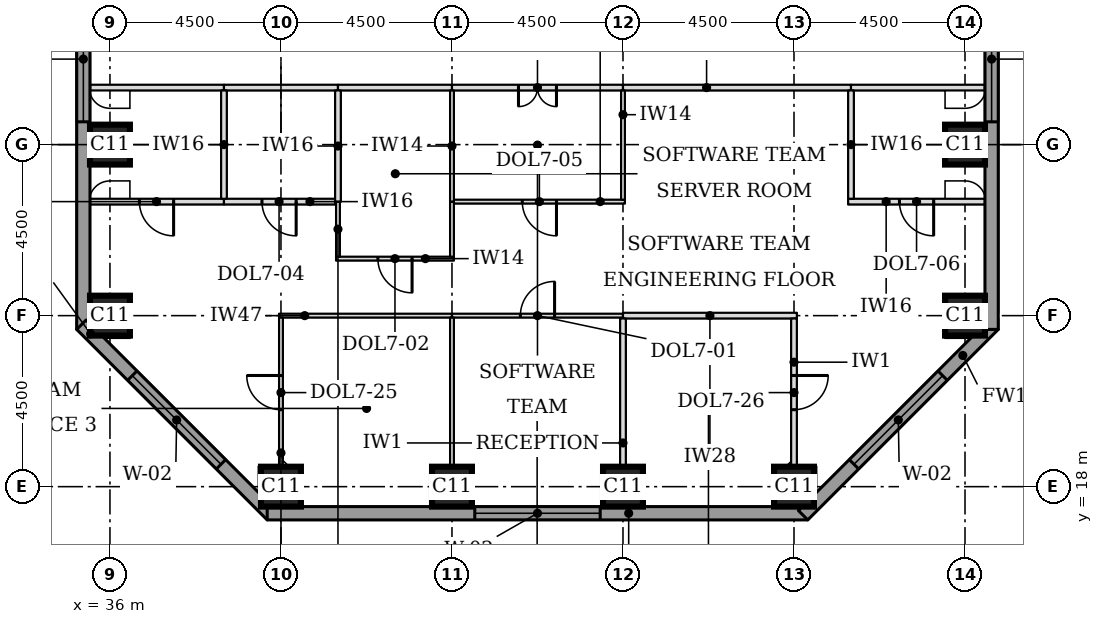
"""IFC4 building model, lengths in metres.
Left out: names, types, materials, properties, quantities, classifications, styles, units other than length and angle.
Written with IfcOpenShell. Run it as: python <this file> out.ifc"""

import sys

from ifc_helpers import new_model, si_unit, direction, frame, frame_2d, origin, origin_2d, place, context, subcontext, project, spatial, rectangle, extrude, element, fill, save


model = new_model("IFC4")
c1 = context("Model", 3, precision=1e-05, world=origin(), true_north=direction((0.0, 1.0)))
c2 = subcontext(c1, "Body", "Model", "MODEL_VIEW")
j1 = project(units=[si_unit("LENGTHUNIT", "METRE"), si_unit("PLANEANGLEUNIT", "RADIAN")], contexts=[c1])
p1 = place(None, origin())
s1 = spatial("IfcSite", under=j1, at=p1, CompositionType="ELEMENT")
p2 = place(p1, origin())
s2 = spatial("IfcBuilding", under=s1, at=p2, CompositionType="ELEMENT")
p3 = place(p2, frame((0.0, 0.0, 127.0)))
s3 = spatial("IfcBuildingStorey", under=s2, at=p3, CompositionType="ELEMENT", Elevation=127.0)
for number, where, z_axis, x_axis in (
    (1, (40.5, 18.0, 0.0), (0.0, 0.0, 1.0), (1.0, 0.0, 0.0)),
    (2, (45.0, 18.0, 0.0), (0.0, 0.0, 1.0), (1.0, 0.0, 0.0)),
    (3, (49.5, 18.0, 0.0), (0.0, 0.0, 1.0), (1.0, 0.0, 0.0)),
    (4, (54.0, 18.0, 0.0), (0.0, 0.0, 1.0), (1.0, 0.0, 0.0)),
    (5, (36.0, 22.5, 0.0), (0.0, 0.0, 1.0), (1.0, 0.0, 0.0)),
    (6, (58.5, 22.5, 0.0), (0.0, 0.0, 1.0), (1.0, 0.0, 0.0)),
    (7, (36.0, 27.0, 0.0), (0.0, 0.0, 1.0), (1.0, 0.0, 0.0)),
    (8, (58.5, 27.0, 0.0), (0.0, 0.0, 1.0), (1.0, 0.0, 0.0)),
):
    element("IfcColumn", number, at=place(p3, frame(where, z_axis=z_axis, x_axis=x_axis)), inside=s3, PredefinedType="COLUMN", context=c2, shape_type="SweptSolid", body=[
        extrude(rectangle(XDim=1.05, YDim=1.05, at=origin_2d()), origin(), (0.0, 0.0, 1.0), 3.7),
    ])
p4 = place(p3, frame((35.3, 39.975, 0.0), z_axis=(0.0, 0.0, 1.0), x_axis=(0.0, -1.0, 0.0)))
e9 = element("IfcWall", 9, at=p4, inside=s3, PredefinedType="STANDARD", context=c2, shape_type="SweptSolid", body=[
    extrude(rectangle(XDim=17.837, YDim=0.35, at=frame_2d((8.919, 0.0))), origin(), (0.0, 0.0, 1.0), 3.525),
])
p5 = place(p4, frame((0.5, 0.0, 0.9)))
e10 = element("IfcOpeningElement", 10, at=p5, cuts=e9, PredefinedType="OPENING", context=c2, shape_type="SweptSolid", body=[
    extrude(rectangle(XDim=3.3, YDim=1.9, at=frame_2d((1.65, 0.95))), frame((0.0, 0.185, 0.0), z_axis=(0.0, -1.0, 0.0), x_axis=(1.0, 0.0, 0.0)), (0.0, 0.0, 1.0), 0.37),
])
p6 = place(p4, frame((9.075, 0.0, 0.9)))
e11 = element("IfcOpeningElement", 11, at=p6, cuts=e9, PredefinedType="OPENING", context=c2, shape_type="SweptSolid", body=[
    extrude(rectangle(XDim=3.3, YDim=1.9, at=frame_2d((1.65, 0.95))), frame((0.0, 0.185, 0.0), z_axis=(0.0, -1.0, 0.0), x_axis=(1.0, 0.0, 0.0)), (0.0, 0.0, 1.0), 0.37),
])
p7 = place(p3, frame((35.249, 22.261, 0.0), z_axis=(0.0, 0.0, 1.0), x_axis=(0.707106781187, -0.707106781187, 0.0)))
e12 = element("IfcWall", 12, at=p7, inside=s3, PredefinedType="STANDARD", context=c2, shape_type="SweptSolid", body=[
    extrude(rectangle(XDim=7.089, YDim=0.35, at=frame_2d((3.544, 0.0))), origin(), (0.0, 0.0, 1.0), 3.525),
])
p8 = place(p7, frame((1.894, 0.0, 0.9)))
e13 = element("IfcOpeningElement", 13, at=p8, cuts=e12, PredefinedType="OPENING", context=c2, shape_type="SweptSolid", body=[
    extrude(rectangle(XDim=3.3, YDim=1.9, at=frame_2d((1.65, 0.95))), frame((0.0, 0.185, 0.0), z_axis=(0.0, -1.0, 0.0), x_axis=(1.0, 0.0, 0.0)), (0.0, 0.0, 1.0), 0.37),
])
p9 = place(p3, frame((40.138, 17.3, 0.0), z_axis=(0.0, 0.0, 1.0), x_axis=(1.0, 0.0, 0.0)))
e14 = element("IfcWall", 14, at=p9, inside=s3, PredefinedType="STANDARD", context=c2, shape_type="SweptSolid", body=[
    extrude(rectangle(XDim=14.225, YDim=0.35, at=frame_2d((7.112, 0.0))), origin(), (0.0, 0.0, 1.0), 3.525),
])
p10 = place(p9, frame((5.462, 0.0, 0.9)))
e15 = element("IfcOpeningElement", 15, at=p10, cuts=e14, PredefinedType="OPENING", context=c2, shape_type="SweptSolid", body=[
    extrude(rectangle(XDim=3.3, YDim=1.9, at=frame_2d((1.65, 0.95))), frame((0.0, 0.185, 0.0), z_axis=(0.0, -1.0, 0.0), x_axis=(1.0, 0.0, 0.0)), (0.0, 0.0, 1.0), 0.37),
])
p11 = place(p3, frame((54.239, 17.249, 0.0), z_axis=(0.0, 0.0, 1.0), x_axis=(0.707106781187, 0.707106781187, 0.0)))
e16 = element("IfcWall", 16, at=p11, inside=s3, PredefinedType="STANDARD", context=c2, shape_type="SweptSolid", body=[
    extrude(rectangle(XDim=7.089, YDim=0.35, at=frame_2d((3.544, 0.0))), origin(), (0.0, 0.0, 1.0), 3.525),
])
p12 = place(p11, frame((1.894, 0.0, 0.9)))
e17 = element("IfcOpeningElement", 17, at=p12, cuts=e16, PredefinedType="OPENING", context=c2, shape_type="SweptSolid", body=[
    extrude(rectangle(XDim=3.3, YDim=1.9, at=frame_2d((1.65, 0.95))), frame((0.0, 0.185, 0.0), z_axis=(0.0, -1.0, 0.0), x_axis=(1.0, 0.0, 0.0)), (0.0, 0.0, 1.0), 0.37),
])
p13 = place(p3, frame((59.2, 22.138, 0.0), z_axis=(0.0, 0.0, 1.0), x_axis=(0.0, 1.0, 0.0)))
e18 = element("IfcWall", 18, at=p13, inside=s3, PredefinedType="STANDARD", context=c2, shape_type="SweptSolid", body=[
    extrude(rectangle(XDim=17.837, YDim=0.35, at=frame_2d((8.919, 0.0))), origin(), (0.0, 0.0, 1.0), 3.525),
])
p14 = place(p13, frame((5.462, 0.0, 0.9)))
e19 = element("IfcOpeningElement", 19, at=p14, cuts=e18, PredefinedType="OPENING", context=c2, shape_type="SweptSolid", body=[
    extrude(rectangle(XDim=3.3, YDim=1.9, at=frame_2d((1.65, 0.95))), frame((0.0, 0.185, 0.0), z_axis=(0.0, -1.0, 0.0), x_axis=(1.0, 0.0, 0.0)), (0.0, 0.0, 1.0), 0.37),
])
p15 = place(p13, frame((14.037, 0.0, 0.9)))
e20 = element("IfcOpeningElement", 20, at=p15, cuts=e18, PredefinedType="OPENING", context=c2, shape_type="SweptSolid", body=[
    extrude(rectangle(XDim=3.3, YDim=1.9, at=frame_2d((1.65, 0.95))), frame((0.0, 0.185, 0.0), z_axis=(0.0, -1.0, 0.0), x_axis=(1.0, 0.0, 0.0)), (0.0, 0.0, 1.0), 0.37),
])
p16 = place(p3, frame((40.45, 22.5, 0.0), z_axis=(0.0, 0.0, 1.0), x_axis=(1.0, 0.0, 0.0)))
e21 = element("IfcWall", 21, at=p16, inside=s3, PredefinedType="PARTITIONING", context=c2, shape_type="SweptSolid", body=[
    extrude(rectangle(XDim=4.55, YDim=0.1, at=frame_2d((2.275, 0.0))), origin(), (0.0, 0.0, 1.0), 2.55),
])
p17 = place(p3, frame((45.0, 22.5, 0.0), z_axis=(0.0, 0.0, 1.0), x_axis=(1.0, 0.0, 0.0)))
e22 = element("IfcWall", 22, at=p17, inside=s3, PredefinedType="PARTITIONING", context=c2, shape_type="SweptSolid", body=[
    extrude(rectangle(XDim=4.5, YDim=0.1, at=frame_2d((2.25, 0.0))), origin(), (0.0, 0.0, 1.0), 2.55),
])
p18 = place(p17, frame((1.8, 0.0, 0.0)))
e23 = element("IfcOpeningElement", 23, at=p18, cuts=e22, PredefinedType="OPENING", context=c2, shape_type="SweptSolid", body=[
    extrude(rectangle(XDim=0.9, YDim=2.1, at=frame_2d((0.45, 1.05))), frame((0.0, 0.06, 0.0), z_axis=(0.0, -1.0, 0.0), x_axis=(1.0, 0.0, 0.0)), (0.0, 0.0, 1.0), 0.12),
])
p19 = place(p3, frame((49.5, 22.5, 0.0), z_axis=(0.0, 0.0, 1.0), x_axis=(1.0, 0.0, 0.0)))
e24 = element("IfcWall", 24, at=p19, inside=s3, PredefinedType="PARTITIONING", context=c2, shape_type="SweptSolid", body=[
    extrude(rectangle(XDim=4.575, YDim=0.15, at=frame_2d((2.288, 0.0))), origin(), (0.0, 0.0, 1.0), 2.55),
])
p20 = place(p3, frame((41.95, 24.0, 0.0), z_axis=(0.0, 0.0, 1.0), x_axis=(1.0, 0.0, 0.0)))
e25 = element("IfcWall", 25, at=p20, inside=s3, PredefinedType="PARTITIONING", context=c2, shape_type="SweptSolid", body=[
    extrude(rectangle(XDim=3.1, YDim=0.1, at=frame_2d((1.55, 0.0))), origin(), (0.0, 0.0, 1.0), 3.55),
])
p21 = place(p20, frame((1.1, 0.0, 0.0)))
e26 = element("IfcOpeningElement", 26, at=p21, cuts=e25, PredefinedType="OPENING", context=c2, shape_type="SweptSolid", body=[
    extrude(rectangle(XDim=0.9, YDim=2.1, at=frame_2d((0.45, 1.05))), frame((0.0, 0.06, 0.0), z_axis=(0.0, -1.0, 0.0), x_axis=(1.0, 0.0, 0.0)), (0.0, 0.0, 1.0), 0.12),
])
p22 = place(p3, frame((35.475, 25.5, 0.0), z_axis=(0.0, 0.0, 1.0), x_axis=(1.0, 0.0, 0.0)))
e27 = element("IfcWall", 27, at=p22, inside=s3, PredefinedType="PARTITIONING", context=c2, shape_type="SweptSolid", body=[
    extrude(rectangle(XDim=3.525, YDim=0.15, at=frame_2d((1.762, 0.0))), origin(), (0.0, 0.0, 1.0), 3.55),
])
p23 = place(p22, frame((1.3, 0.0, 0.0)))
e28 = element("IfcOpeningElement", 28, at=p23, cuts=e27, PredefinedType="OPENING", context=c2, shape_type="SweptSolid", body=[
    extrude(rectangle(XDim=0.9, YDim=2.1, at=frame_2d((0.45, 1.05))), frame((0.0, 0.085, 0.0), z_axis=(0.0, -1.0, 0.0), x_axis=(1.0, 0.0, 0.0)), (0.0, 0.0, 1.0), 0.17),
])
p24 = place(p3, frame((39.0, 25.5, 0.0), z_axis=(0.0, 0.0, 1.0), x_axis=(1.0, 0.0, 0.0)))
e29 = element("IfcWall", 29, at=p24, inside=s3, PredefinedType="PARTITIONING", context=c2, shape_type="SweptSolid", body=[
    extrude(rectangle(XDim=2.925, YDim=0.15, at=frame_2d((1.462, 0.0))), origin(), (0.0, 0.0, 1.0), 3.55),
])
p25 = place(p24, frame((1.0, 0.0, 0.0)))
e30 = element("IfcOpeningElement", 30, at=p25, cuts=e29, PredefinedType="OPENING", context=c2, shape_type="SweptSolid", body=[
    extrude(rectangle(XDim=0.9, YDim=2.1, at=frame_2d((0.45, 1.05))), frame((0.0, 0.085, 0.0), z_axis=(0.0, -1.0, 0.0), x_axis=(1.0, 0.0, 0.0)), (0.0, 0.0, 1.0), 0.17),
])
p26 = place(p3, frame((45.05, 25.5, 0.0), z_axis=(0.0, 0.0, 1.0), x_axis=(1.0, 0.0, 0.0)))
e31 = element("IfcWall", 31, at=p26, inside=s3, PredefinedType="PARTITIONING", context=c2, shape_type="SweptSolid", body=[
    extrude(rectangle(XDim=4.5, YDim=0.1, at=frame_2d((2.25, 0.0))), origin(), (0.0, 0.0, 1.0), 3.55),
])
p27 = place(p26, frame((1.8, 0.0, 0.0)))
e32 = element("IfcOpeningElement", 32, at=p27, cuts=e31, PredefinedType="OPENING", context=c2, shape_type="SweptSolid", body=[
    extrude(rectangle(XDim=0.9, YDim=2.1, at=frame_2d((0.45, 1.05))), frame((0.0, 0.06, 0.0), z_axis=(0.0, -1.0, 0.0), x_axis=(1.0, 0.0, 0.0)), (0.0, 0.0, 1.0), 0.12),
])
p28 = place(p3, frame((55.425, 25.5, 0.0), z_axis=(0.0, 0.0, 1.0), x_axis=(1.0, 0.0, 0.0)))
e33 = element("IfcWall", 33, at=p28, inside=s3, PredefinedType="PARTITIONING", context=c2, shape_type="SweptSolid", body=[
    extrude(rectangle(XDim=3.6, YDim=0.15, at=frame_2d((1.8, 0.0))), origin(), (0.0, 0.0, 1.0), 3.55),
])
p29 = place(p28, frame((1.35, 0.0, 0.0)))
e34 = element("IfcOpeningElement", 34, at=p29, cuts=e33, PredefinedType="OPENING", context=c2, shape_type="SweptSolid", body=[
    extrude(rectangle(XDim=0.9, YDim=2.1, at=frame_2d((0.45, 1.05))), frame((0.0, 0.085, 0.0), z_axis=(0.0, -1.0, 0.0), x_axis=(1.0, 0.0, 0.0)), (0.0, 0.0, 1.0), 0.17),
])
p30 = place(p3, frame((35.475, 28.5, 0.0), z_axis=(0.0, 0.0, 1.0), x_axis=(1.0, 0.0, 0.0)))
e35 = element("IfcWall", 35, at=p30, inside=s3, PredefinedType="PARTITIONING", context=c2, shape_type="SweptSolid", body=[
    extrude(rectangle(XDim=3.525, YDim=0.15, at=frame_2d((1.762, 0.0))), origin(), (0.0, 0.0, 1.0), 3.55),
])
for number, where, z_axis, x_axis in (
    (36, (39.0, 28.5, 0.0), (0.0, 0.0, 1.0), (1.0, 0.0, 0.0)),
    (37, (42.0, 28.5, 0.0), (0.0, 0.0, 1.0), (1.0, 0.0, 0.0)),
):
    element("IfcWall", number, at=place(p3, frame(where, z_axis=z_axis, x_axis=x_axis)), inside=s3, PredefinedType="PARTITIONING", context=c2, shape_type="SweptSolid", body=[
        extrude(rectangle(XDim=3.0, YDim=0.15, at=frame_2d((1.5, 0.0))), origin(), (0.0, 0.0, 1.0), 3.55),
    ])
p31 = place(p3, frame((45.0, 28.5, 0.0), z_axis=(0.0, 0.0, 1.0), x_axis=(1.0, 0.0, 0.0)))
e38 = element("IfcWall", 38, at=p31, inside=s3, PredefinedType="PARTITIONING", context=c2, shape_type="SweptSolid", body=[
    extrude(rectangle(XDim=4.5, YDim=0.15, at=frame_2d((2.25, 0.0))), origin(), (0.0, 0.0, 1.0), 3.55),
])
p32 = place(p31, frame((1.75, 0.0, 0.0)))
e39 = element("IfcOpeningElement", 39, at=p32, cuts=e38, PredefinedType="OPENING", context=c2, shape_type="SweptSolid", body=[
    extrude(rectangle(XDim=1.0, YDim=2.1, at=frame_2d((0.5, 1.05))), frame((0.0, 0.085, 0.0), z_axis=(0.0, -1.0, 0.0), x_axis=(1.0, 0.0, 0.0)), (0.0, 0.0, 1.0), 0.17),
])
p33 = place(p3, frame((49.5, 28.5, 0.0), z_axis=(0.0, 0.0, 1.0), x_axis=(1.0, 0.0, 0.0)))
e40 = element("IfcWall", 40, at=p33, inside=s3, PredefinedType="PARTITIONING", context=c2, shape_type="SweptSolid", body=[
    extrude(rectangle(XDim=6.0, YDim=0.15, at=frame_2d((3.0, 0.0))), origin(), (0.0, 0.0, 1.0), 3.55),
])
p34 = place(p3, frame((55.5, 28.5, 0.0), z_axis=(0.0, 0.0, 1.0), x_axis=(1.0, 0.0, 0.0)))
e41 = element("IfcWall", 41, at=p34, inside=s3, PredefinedType="PARTITIONING", context=c2, shape_type="SweptSolid", body=[
    extrude(rectangle(XDim=3.525, YDim=0.15, at=frame_2d((1.762, 0.0))), origin(), (0.0, 0.0, 1.0), 3.55),
])
p35 = place(p3, frame((45.0, 17.475, 0.0), z_axis=(0.0, 0.0, 1.0), x_axis=(0.0, 1.0, 0.0)))
e42 = element("IfcWall", 42, at=p35, inside=s3, PredefinedType="PARTITIONING", context=c2, shape_type="SweptSolid", body=[
    extrude(rectangle(XDim=4.975, YDim=0.1, at=frame_2d((2.487, 0.0))), origin(), (0.0, 0.0, 1.0), 3.55),
])
p36 = place(p3, frame((49.5, 17.475, 0.0), z_axis=(0.0, 0.0, 1.0), x_axis=(0.0, 1.0, 0.0)))
e43 = element("IfcWall", 43, at=p36, inside=s3, PredefinedType="PARTITIONING", context=c2, shape_type="SweptSolid", body=[
    extrude(rectangle(XDim=4.95, YDim=0.15, at=frame_2d((2.475, 0.0))), origin(), (0.0, 0.0, 1.0), 3.55),
])
p37 = place(p3, frame((40.5, 18.525, 0.0), z_axis=(0.0, 0.0, 1.0), x_axis=(0.0, 1.0, 0.0)))
e44 = element("IfcWall", 44, at=p37, inside=s3, PredefinedType="PARTITIONING", context=c2, shape_type="SweptSolid", body=[
    extrude(rectangle(XDim=3.925, YDim=0.1, at=frame_2d((1.962, 0.0))), origin(), (0.0, 0.0, 1.0), 3.55),
])
p38 = place(p37, frame((1.5, 0.0, 0.0)))
e45 = element("IfcOpeningElement", 45, at=p38, cuts=e44, PredefinedType="OPENING", context=c2, shape_type="SweptSolid", body=[
    extrude(rectangle(XDim=0.9, YDim=2.1, at=frame_2d((0.45, 1.05))), frame((0.0, 0.06, 0.0), z_axis=(0.0, -1.0, 0.0), x_axis=(1.0, 0.0, 0.0)), (0.0, 0.0, 1.0), 0.12),
])
p39 = place(p3, frame((54.0, 18.525, 0.0), z_axis=(0.0, 0.0, 1.0), x_axis=(0.0, 1.0, 0.0)))
e46 = element("IfcWall", 46, at=p39, inside=s3, PredefinedType="PARTITIONING", context=c2, shape_type="SweptSolid", body=[
    extrude(rectangle(XDim=3.9, YDim=0.15, at=frame_2d((1.95, 0.0))), origin(), (0.0, 0.0, 1.0), 3.55),
])
p40 = place(p39, frame((1.5, 0.0, 0.0)))
e47 = element("IfcOpeningElement", 47, at=p40, cuts=e46, PredefinedType="OPENING", context=c2, shape_type="SweptSolid", body=[
    extrude(rectangle(XDim=0.9, YDim=2.1, at=frame_2d((0.45, 1.05))), frame((0.0, 0.085, 0.0), z_axis=(0.0, -1.0, 0.0), x_axis=(1.0, 0.0, 0.0)), (0.0, 0.0, 1.0), 0.17),
])
for number, where, z_axis, x_axis in (
    (48, (42.0, 24.05, 0.0), (0.0, 0.0, 1.0), (0.0, 1.0, 0.0)),
    (49, (45.0, 24.05, 0.0), (0.0, 0.0, 1.0), (0.0, 1.0, 0.0)),
):
    element("IfcWall", number, at=place(p3, frame(where, z_axis=z_axis, x_axis=x_axis)), inside=s3, PredefinedType="PARTITIONING", context=c2, shape_type="SweptSolid", body=[
        extrude(rectangle(XDim=1.45, YDim=0.1, at=frame_2d((0.725, 0.0))), origin(), (0.0, 0.0, 1.0), 3.55),
    ])
p41 = place(p3, frame((42.0, 25.5, 0.0), z_axis=(0.0, 0.0, 1.0), x_axis=(0.0, 1.0, 0.0)))
e50 = element("IfcWall", 50, at=p41, inside=s3, PredefinedType="PARTITIONING", context=c2, shape_type="SweptSolid", body=[
    extrude(rectangle(XDim=2.925, YDim=0.15, at=frame_2d((1.462, 0.0))), origin(), (0.0, 0.0, 1.0), 3.55),
])
p42 = place(p3, frame((45.0, 25.5, 0.0), z_axis=(0.0, 0.0, 1.0), x_axis=(0.0, 1.0, 0.0)))
e51 = element("IfcWall", 51, at=p42, inside=s3, PredefinedType="PARTITIONING", context=c2, shape_type="SweptSolid", body=[
    extrude(rectangle(XDim=2.925, YDim=0.1, at=frame_2d((1.462, 0.0))), origin(), (0.0, 0.0, 1.0), 3.55),
])
p43 = place(p3, frame((49.5, 25.55, 0.0), z_axis=(0.0, 0.0, 1.0), x_axis=(0.0, 1.0, 0.0)))
e52 = element("IfcWall", 52, at=p43, inside=s3, PredefinedType="PARTITIONING", context=c2, shape_type="SweptSolid", body=[
    extrude(rectangle(XDim=2.875, YDim=0.1, at=frame_2d((1.438, 0.0))), origin(), (0.0, 0.0, 1.0), 3.55),
])
for number, where, z_axis, x_axis in (
    (53, (39.0, 25.575, 0.0), (0.0, 0.0, 1.0), (0.0, 1.0, 0.0)),
    (54, (55.5, 25.575, 0.0), (0.0, 0.0, 1.0), (0.0, 1.0, 0.0)),
):
    element("IfcWall", number, at=place(p3, frame(where, z_axis=z_axis, x_axis=x_axis)), inside=s3, PredefinedType="PARTITIONING", context=c2, shape_type="SweptSolid", body=[
        extrude(rectangle(XDim=2.85, YDim=0.15, at=frame_2d((1.425, 0.0))), origin(), (0.0, 0.0, 1.0), 3.55),
    ])
p44 = place(p6, origin())
e55 = element("IfcWindow", 55, at=p44, inside=s3, PartitioningType="SINGLE_PANEL", PredefinedType="WINDOW", context=c2, shape_type="SweptSolid", body=[
    extrude(rectangle(XDim=3.3, YDim=1.9, at=frame_2d((1.65, 0.95))), frame((0.0, 0.085, 0.0), z_axis=(0.0, -1.0, 0.0), x_axis=(1.0, 0.0, 0.0)), (0.0, 0.0, 1.0), 0.06),
])
fill(e11, e55)
p45 = place(p8, origin())
e56 = element("IfcWindow", 56, at=p45, inside=s3, PartitioningType="SINGLE_PANEL", PredefinedType="WINDOW", context=c2, shape_type="SweptSolid", body=[
    extrude(rectangle(XDim=3.3, YDim=1.9, at=frame_2d((1.65, 0.95))), frame((0.0, 0.085, 0.0), z_axis=(0.0, -1.0, 0.0), x_axis=(1.0, 0.0, 0.0)), (0.0, 0.0, 1.0), 0.06),
])
fill(e13, e56)
p46 = place(p10, origin())
e57 = element("IfcWindow", 57, at=p46, inside=s3, PartitioningType="SINGLE_PANEL", PredefinedType="WINDOW", context=c2, shape_type="SweptSolid", body=[
    extrude(rectangle(XDim=3.3, YDim=1.9, at=frame_2d((1.65, 0.95))), frame((0.0, 0.085, 0.0), z_axis=(0.0, -1.0, 0.0), x_axis=(1.0, 0.0, 0.0)), (0.0, 0.0, 1.0), 0.06),
])
fill(e15, e57)
p47 = place(p12, origin())
e58 = element("IfcWindow", 58, at=p47, inside=s3, PartitioningType="SINGLE_PANEL", PredefinedType="WINDOW", context=c2, shape_type="SweptSolid", body=[
    extrude(rectangle(XDim=3.3, YDim=1.9, at=frame_2d((1.65, 0.95))), frame((0.0, 0.085, 0.0), z_axis=(0.0, -1.0, 0.0), x_axis=(1.0, 0.0, 0.0)), (0.0, 0.0, 1.0), 0.06),
])
fill(e17, e58)
p48 = place(p14, origin())
e59 = element("IfcWindow", 59, at=p48, inside=s3, PartitioningType="SINGLE_PANEL", PredefinedType="WINDOW", context=c2, shape_type="SweptSolid", body=[
    extrude(rectangle(XDim=3.3, YDim=1.9, at=frame_2d((1.65, 0.95))), frame((0.0, 0.085, 0.0), z_axis=(0.0, -1.0, 0.0), x_axis=(1.0, 0.0, 0.0)), (0.0, 0.0, 1.0), 0.06),
])
fill(e19, e59)
p49 = place(p32, frame((1.0, 0.0, 0.0), z_axis=(0.0, 0.0, 1.0), x_axis=(-1.0, 0.0, 0.0)))
e60 = element("IfcDoor", 60, at=p49, inside=s3, OperationType="DOUBLE_DOOR_SINGLE_SWING", PredefinedType="DOOR", context=c2, shape_type="SweptSolid", body=[
    extrude(rectangle(XDim=1.0, YDim=2.1, at=frame_2d((0.5, 1.05))), frame((0.0, 0.025, 0.0), z_axis=(0.0, -1.0, 0.0), x_axis=(1.0, 0.0, 0.0)), (0.0, 0.0, 1.0), 0.05),
])
fill(e39, e60)
p50 = place(p27, frame((0.9, 0.0, 0.0), z_axis=(0.0, 0.0, 1.0), x_axis=(-1.0, 0.0, 0.0)))
e61 = element("IfcDoor", 61, at=p50, inside=s3, OperationType="SINGLE_SWING_LEFT", PredefinedType="DOOR", context=c2, shape_type="SweptSolid", body=[
    extrude(rectangle(XDim=0.9, YDim=2.1, at=frame_2d((0.45, 1.05))), frame((0.0, 0.025, 0.0), z_axis=(0.0, -1.0, 0.0), x_axis=(1.0, 0.0, 0.0)), (0.0, 0.0, 1.0), 0.05),
])
fill(e32, e61)
p51 = place(p25, frame((0.9, 0.0, 0.0), z_axis=(0.0, 0.0, 1.0), x_axis=(-1.0, 0.0, 0.0)))
e62 = element("IfcDoor", 62, at=p51, inside=s3, OperationType="SINGLE_SWING_LEFT", PredefinedType="DOOR", context=c2, shape_type="SweptSolid", body=[
    extrude(rectangle(XDim=0.9, YDim=2.1, at=frame_2d((0.45, 1.05))), frame((0.0, 0.025, 0.0), z_axis=(0.0, -1.0, 0.0), x_axis=(1.0, 0.0, 0.0)), (0.0, 0.0, 1.0), 0.05),
])
fill(e30, e62)
p52 = place(p38, origin())
e63 = element("IfcDoor", 63, at=p52, inside=s3, OperationType="SINGLE_SWING_RIGHT", PredefinedType="DOOR", context=c2, shape_type="SweptSolid", body=[
    extrude(rectangle(XDim=0.9, YDim=2.1, at=frame_2d((0.45, 1.05))), frame((0.0, 0.025, 0.0), z_axis=(0.0, -1.0, 0.0), x_axis=(1.0, 0.0, 0.0)), (0.0, 0.0, 1.0), 0.05),
])
fill(e45, e63)
p53 = place(p18, origin())
e64 = element("IfcDoor", 64, at=p53, inside=s3, OperationType="SINGLE_SWING_RIGHT", PredefinedType="DOOR", context=c2, shape_type="SweptSolid", body=[
    extrude(rectangle(XDim=0.9, YDim=2.1, at=frame_2d((0.45, 1.05))), frame((0.0, 0.025, 0.0), z_axis=(0.0, -1.0, 0.0), x_axis=(1.0, 0.0, 0.0)), (0.0, 0.0, 1.0), 0.05),
])
fill(e23, e64)
p54 = place(p29, frame((0.9, 0.0, 0.0), z_axis=(0.0, 0.0, 1.0), x_axis=(-1.0, 0.0, 0.0)))
e65 = element("IfcDoor", 65, at=p54, inside=s3, OperationType="SINGLE_SWING_LEFT", PredefinedType="DOOR", context=c2, shape_type="SweptSolid", body=[
    extrude(rectangle(XDim=0.9, YDim=2.1, at=frame_2d((0.45, 1.05))), frame((0.0, 0.025, 0.0), z_axis=(0.0, -1.0, 0.0), x_axis=(1.0, 0.0, 0.0)), (0.0, 0.0, 1.0), 0.05),
])
fill(e34, e65)
p55 = place(p40, frame((0.9, 0.0, 0.0), z_axis=(0.0, 0.0, 1.0), x_axis=(-1.0, 0.0, 0.0)))
e66 = element("IfcDoor", 66, at=p55, inside=s3, OperationType="SINGLE_SWING_LEFT", PredefinedType="DOOR", context=c2, shape_type="SweptSolid", body=[
    extrude(rectangle(XDim=0.9, YDim=2.1, at=frame_2d((0.45, 1.05))), frame((0.0, 0.025, 0.0), z_axis=(0.0, -1.0, 0.0), x_axis=(1.0, 0.0, 0.0)), (0.0, 0.0, 1.0), 0.05),
])
fill(e47, e66)
p56 = place(p21, frame((0.9, 0.0, 0.0), z_axis=(0.0, 0.0, 1.0), x_axis=(-1.0, 0.0, 0.0)))
e67 = element("IfcDoor", 67, at=p56, inside=s3, OperationType="SINGLE_SWING_LEFT", PredefinedType="DOOR", context=c2, shape_type="SweptSolid", body=[
    extrude(rectangle(XDim=0.9, YDim=2.1, at=frame_2d((0.45, 1.05))), frame((0.0, 0.025, 0.0), z_axis=(0.0, -1.0, 0.0), x_axis=(1.0, 0.0, 0.0)), (0.0, 0.0, 1.0), 0.05),
])
fill(e26, e67)
p57 = place(p23, frame((0.9, 0.0, 0.0), z_axis=(0.0, 0.0, 1.0), x_axis=(-1.0, 0.0, 0.0)))
e68 = element("IfcDoor", 68, at=p57, inside=s3, OperationType="SINGLE_SWING_LEFT", PredefinedType="DOOR", context=c2, shape_type="SweptSolid", body=[
    extrude(rectangle(XDim=0.9, YDim=2.1, at=frame_2d((0.45, 1.05))), frame((0.0, 0.025, 0.0), z_axis=(0.0, -1.0, 0.0), x_axis=(1.0, 0.0, 0.0)), (0.0, 0.0, 1.0), 0.05),
])
fill(e28, e68)
save(model, sys.argv[1])
